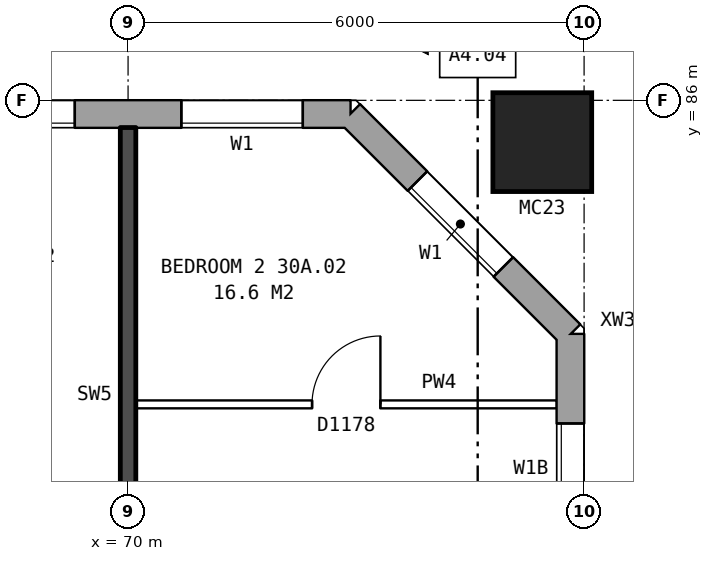
"""IFC4 building model, lengths in metres.
Left out: names, types, materials, properties, quantities, classifications, styles, units other than length and angle.
Written with IfcOpenShell. Run it as: python <this file> out.ifc"""

import sys

from ifc_helpers import new_model, si_unit, direction, frame, frame_2d, origin, origin_2d, place, context, subcontext, project, spatial, rectangle, hollow_rectangle, extrude, element, fill, save


model = new_model("IFC4")
c1 = context("Model", 3, precision=1e-05, world=origin(), true_north=direction((0.0, 1.0)))
c2 = subcontext(c1, "Body", "Model", "MODEL_VIEW")
j1 = project(units=[si_unit("LENGTHUNIT", "METRE"), si_unit("PLANEANGLEUNIT", "RADIAN")], contexts=[c1])
p1 = place(None, origin())
s1 = spatial("IfcSite", under=j1, at=p1, CompositionType="ELEMENT")
p2 = place(p1, origin())
s2 = spatial("IfcBuilding", under=s1, at=p2, CompositionType="ELEMENT")
p3 = place(p2, frame((0.0, 0.0, 108.8)))
s3 = spatial("IfcBuildingStorey", under=s2, at=p3, CompositionType="ELEMENT", Elevation=108.8)
p4 = place(p3, frame((75.45, 85.45, 0.0), z_axis=(0.0, 0.0, 1.0), x_axis=(1.0, 0.0, 0.0)))
e1 = element("IfcColumn", 1, at=p4, inside=s3, PredefinedType="COLUMN", context=c2, shape_type="SweptSolid", body=[
    extrude(hollow_rectangle(XDim=1.3, YDim=1.3, WallThickness=0.07, at=origin_2d()), origin(), (0.0, 0.0, 1.0), 3.1),
])
p5 = place(p3, frame((75.82, 57.075, 0.0), z_axis=(0.0, 0.0, 1.0), x_axis=(0.0, 1.0, 0.0)))
e2 = element("IfcWall", 2, at=p5, inside=s3, PredefinedType="STANDARD", context=c2, shape_type="SweptSolid", body=[
    extrude(rectangle(XDim=25.851, YDim=0.36, at=frame_2d((12.925, 0.0))), origin(), (0.0, 0.0, 1.0), 2.85),
])
p6 = place(p5, frame((0.3, 0.0, 0.8)))
e3 = element("IfcOpeningElement", 3, at=p6, cuts=e2, PredefinedType="OPENING", context=c2, shape_type="SweptSolid", body=[
    extrude(rectangle(XDim=1.4, YDim=1.8, at=frame_2d((0.7, 0.9))), frame((0.0, 0.19, 0.0), z_axis=(0.0, -1.0, 0.0), x_axis=(1.0, 0.0, 0.0)), (0.0, 0.0, 1.0), 0.38),
])
p7 = place(p5, frame((4.075, 0.0, 0.25)))
e4 = element("IfcOpeningElement", 4, at=p7, cuts=e2, PredefinedType="OPENING", context=c2, shape_type="SweptSolid", body=[
    extrude(rectangle(XDim=0.6, YDim=0.9, at=frame_2d((0.3, 0.45))), frame((0.0, 0.19, 0.0), z_axis=(0.0, -1.0, 0.0), x_axis=(1.0, 0.0, 0.0)), (0.0, 0.0, 1.0), 0.38),
])
p8 = place(p5, frame((19.225, 0.0, 1.7)))
e5 = element("IfcOpeningElement", 5, at=p8, cuts=e2, PredefinedType="OPENING", context=c2, shape_type="SweptSolid", body=[
    extrude(rectangle(XDim=1.6, YDim=0.9, at=frame_2d((0.8, 0.45))), frame((0.0, 0.19, 0.0), z_axis=(0.0, -1.0, 0.0), x_axis=(1.0, 0.0, 0.0)), (0.0, 0.0, 1.0), 0.38),
])
p9 = place(p5, frame((21.975, 0.0, 0.8)))
e6 = element("IfcOpeningElement", 6, at=p9, cuts=e2, PredefinedType="OPENING", context=c2, shape_type="SweptSolid", body=[
    extrude(rectangle(XDim=1.2, YDim=0.9, at=frame_2d((0.6, 0.45))), frame((0.0, 0.19, 0.0), z_axis=(0.0, -1.0, 0.0), x_axis=(1.0, 0.0, 0.0)), (0.0, 0.0, 1.0), 0.38),
])
p10 = place(p5, frame((2.0, 0.0, 0.8)))
e7 = element("IfcOpeningElement", 7, at=p10, cuts=e2, PredefinedType="OPENING", context=c2, shape_type="SweptSolid", body=[
    extrude(rectangle(XDim=0.8, YDim=1.5, at=frame_2d((0.4, 0.75))), frame((0.0, 0.19, 0.0), z_axis=(0.0, -1.0, 0.0), x_axis=(1.0, 0.0, 0.0)), (0.0, 0.0, 1.0), 0.38),
])
p11 = place(p5, frame((5.075, 0.0, 1.65)))
e8 = element("IfcOpeningElement", 8, at=p11, cuts=e2, PredefinedType="OPENING", context=c2, shape_type="SweptSolid", body=[
    extrude(rectangle(XDim=1.4, YDim=0.9, at=frame_2d((0.7, 0.45))), frame((0.0, 0.19, 0.0), z_axis=(0.0, -1.0, 0.0), x_axis=(1.0, 0.0, 0.0)), (0.0, 0.0, 1.0), 0.38),
])
p12 = place(p5, frame((23.475, 0.0, 0.8)))
e9 = element("IfcOpeningElement", 9, at=p12, cuts=e2, PredefinedType="OPENING", context=c2, shape_type="SweptSolid", body=[
    extrude(rectangle(XDim=1.2, YDim=1.8, at=frame_2d((0.6, 0.9))), frame((0.0, 0.19, 0.0), z_axis=(0.0, -1.0, 0.0), x_axis=(1.0, 0.0, 0.0)), (0.0, 0.0, 1.0), 0.38),
])
p13 = place(p3, frame((75.82, 82.925, 0.0), z_axis=(0.0, 0.0, 1.0), x_axis=(-0.707106781187, 0.707106781187, 0.0)))
e10 = element("IfcWall", 10, at=p13, inside=s3, PredefinedType="STANDARD", context=c2, shape_type="SweptSolid", body=[
    extrude(rectangle(XDim=4.094, YDim=0.36, at=frame_2d((2.047, 0.0))), origin(), (0.0, 0.0, 1.0), 2.85),
])
p14 = place(p13, frame((1.247, 0.0, 0.8)))
e11 = element("IfcOpeningElement", 11, at=p14, cuts=e10, PredefinedType="OPENING", context=c2, shape_type="SweptSolid", body=[
    extrude(rectangle(XDim=1.6, YDim=1.8, at=frame_2d((0.8, 0.9))), frame((0.0, 0.19, 0.0), z_axis=(0.0, -1.0, 0.0), x_axis=(1.0, 0.0, 0.0)), (0.0, 0.0, 1.0), 0.38),
])
p15 = place(p3, frame((72.925, 85.82, 0.0), z_axis=(0.0, 0.0, 1.0), x_axis=(-1.0, 0.0, 0.0)))
e12 = element("IfcWall", 12, at=p15, inside=s3, PredefinedType="STANDARD", context=c2, shape_type="SweptSolid", body=[
    extrude(rectangle(XDim=44.851, YDim=0.36, at=frame_2d((22.425, 0.0))), origin(), (0.0, 0.0, 1.0), 2.85),
])
p16 = place(p15, frame((0.625, 0.0, 0.8)))
e13 = element("IfcOpeningElement", 13, at=p16, cuts=e12, PredefinedType="OPENING", context=c2, shape_type="SweptSolid", body=[
    extrude(rectangle(XDim=1.6, YDim=1.8, at=frame_2d((0.8, 0.9))), frame((0.0, 0.19, 0.0), z_axis=(0.0, -1.0, 0.0), x_axis=(1.0, 0.0, 0.0)), (0.0, 0.0, 1.0), 0.38),
])
p17 = place(p15, frame((3.625, 0.0, 0.8)))
e14 = element("IfcOpeningElement", 14, at=p17, cuts=e12, PredefinedType="OPENING", context=c2, shape_type="SweptSolid", body=[
    extrude(rectangle(XDim=1.6, YDim=1.8, at=frame_2d((0.8, 0.9))), frame((0.0, 0.19, 0.0), z_axis=(0.0, -1.0, 0.0), x_axis=(1.0, 0.0, 0.0)), (0.0, 0.0, 1.0), 0.38),
])
p18 = place(p15, frame((6.625, 0.0, 0.8)))
e15 = element("IfcOpeningElement", 15, at=p18, cuts=e12, PredefinedType="OPENING", context=c2, shape_type="SweptSolid", body=[
    extrude(rectangle(XDim=1.6, YDim=1.8, at=frame_2d((0.8, 0.9))), frame((0.0, 0.19, 0.0), z_axis=(0.0, -1.0, 0.0), x_axis=(1.0, 0.0, 0.0)), (0.0, 0.0, 1.0), 0.38),
])
p19 = place(p15, frame((9.625, 0.0, 0.8)))
e16 = element("IfcOpeningElement", 16, at=p19, cuts=e12, PredefinedType="OPENING", context=c2, shape_type="SweptSolid", body=[
    extrude(rectangle(XDim=1.6, YDim=1.8, at=frame_2d((0.8, 0.9))), frame((0.0, 0.19, 0.0), z_axis=(0.0, -1.0, 0.0), x_axis=(1.0, 0.0, 0.0)), (0.0, 0.0, 1.0), 0.38),
])
p20 = place(p15, frame((12.625, 0.0, 0.8)))
e17 = element("IfcOpeningElement", 17, at=p20, cuts=e12, PredefinedType="OPENING", context=c2, shape_type="SweptSolid", body=[
    extrude(rectangle(XDim=1.6, YDim=1.8, at=frame_2d((0.8, 0.9))), frame((0.0, 0.19, 0.0), z_axis=(0.0, -1.0, 0.0), x_axis=(1.0, 0.0, 0.0)), (0.0, 0.0, 1.0), 0.38),
])
p21 = place(p15, frame((15.125, 0.0, 1.65)))
e18 = element("IfcOpeningElement", 18, at=p21, cuts=e12, PredefinedType="OPENING", context=c2, shape_type="SweptSolid", body=[
    extrude(rectangle(XDim=1.0, YDim=0.9, at=frame_2d((0.5, 0.45))), frame((0.0, 0.19, 0.0), z_axis=(0.0, -1.0, 0.0), x_axis=(1.0, 0.0, 0.0)), (0.0, 0.0, 1.0), 0.38),
])
p22 = place(p15, frame((18.625, 0.0, 0.8)))
e19 = element("IfcOpeningElement", 19, at=p22, cuts=e12, PredefinedType="OPENING", context=c2, shape_type="SweptSolid", body=[
    extrude(rectangle(XDim=1.6, YDim=1.8, at=frame_2d((0.8, 0.9))), frame((0.0, 0.19, 0.0), z_axis=(0.0, -1.0, 0.0), x_axis=(1.0, 0.0, 0.0)), (0.0, 0.0, 1.0), 0.38),
])
p23 = place(p15, frame((21.625, 0.0, 0.8)))
e20 = element("IfcOpeningElement", 20, at=p23, cuts=e12, PredefinedType="OPENING", context=c2, shape_type="SweptSolid", body=[
    extrude(rectangle(XDim=1.6, YDim=1.8, at=frame_2d((0.8, 0.9))), frame((0.0, 0.19, 0.0), z_axis=(0.0, -1.0, 0.0), x_axis=(1.0, 0.0, 0.0)), (0.0, 0.0, 1.0), 0.38),
])
p24 = place(p15, frame((24.625, 0.0, 0.8)))
e21 = element("IfcOpeningElement", 21, at=p24, cuts=e12, PredefinedType="OPENING", context=c2, shape_type="SweptSolid", body=[
    extrude(rectangle(XDim=1.6, YDim=1.8, at=frame_2d((0.8, 0.9))), frame((0.0, 0.19, 0.0), z_axis=(0.0, -1.0, 0.0), x_axis=(1.0, 0.0, 0.0)), (0.0, 0.0, 1.0), 0.38),
])
p25 = place(p15, frame((29.075, 0.0, 1.4)))
e22 = element("IfcOpeningElement", 22, at=p25, cuts=e12, PredefinedType="OPENING", context=c2, shape_type="SweptSolid", body=[
    extrude(rectangle(XDim=1.2, YDim=1.2, at=frame_2d((0.6, 0.6))), frame((0.0, 0.19, 0.0), z_axis=(0.0, -1.0, 0.0), x_axis=(1.0, 0.0, 0.0)), (0.0, 0.0, 1.0), 0.38),
])
p26 = place(p15, frame((30.625, 0.0, 0.8)))
e23 = element("IfcOpeningElement", 23, at=p26, cuts=e12, PredefinedType="OPENING", context=c2, shape_type="SweptSolid", body=[
    extrude(rectangle(XDim=1.6, YDim=1.8, at=frame_2d((0.8, 0.9))), frame((0.0, 0.19, 0.0), z_axis=(0.0, -1.0, 0.0), x_axis=(1.0, 0.0, 0.0)), (0.0, 0.0, 1.0), 0.38),
])
p27 = place(p15, frame((33.625, 0.0, 0.8)))
e24 = element("IfcOpeningElement", 24, at=p27, cuts=e12, PredefinedType="OPENING", context=c2, shape_type="SweptSolid", body=[
    extrude(rectangle(XDim=1.6, YDim=1.8, at=frame_2d((0.8, 0.9))), frame((0.0, 0.19, 0.0), z_axis=(0.0, -1.0, 0.0), x_axis=(1.0, 0.0, 0.0)), (0.0, 0.0, 1.0), 0.38),
])
p28 = place(p15, frame((36.625, 0.0, 0.8)))
e25 = element("IfcOpeningElement", 25, at=p28, cuts=e12, PredefinedType="OPENING", context=c2, shape_type="SweptSolid", body=[
    extrude(rectangle(XDim=1.6, YDim=1.8, at=frame_2d((0.8, 0.9))), frame((0.0, 0.19, 0.0), z_axis=(0.0, -1.0, 0.0), x_axis=(1.0, 0.0, 0.0)), (0.0, 0.0, 1.0), 0.38),
])
p29 = place(p15, frame((39.625, 0.0, 0.8)))
e26 = element("IfcOpeningElement", 26, at=p29, cuts=e12, PredefinedType="OPENING", context=c2, shape_type="SweptSolid", body=[
    extrude(rectangle(XDim=1.6, YDim=1.8, at=frame_2d((0.8, 0.9))), frame((0.0, 0.19, 0.0), z_axis=(0.0, -1.0, 0.0), x_axis=(1.0, 0.0, 0.0)), (0.0, 0.0, 1.0), 0.38),
])
p30 = place(p15, frame((42.625, 0.0, 0.8)))
e27 = element("IfcOpeningElement", 27, at=p30, cuts=e12, PredefinedType="OPENING", context=c2, shape_type="SweptSolid", body=[
    extrude(rectangle(XDim=1.6, YDim=1.8, at=frame_2d((0.8, 0.9))), frame((0.0, 0.19, 0.0), z_axis=(0.0, -1.0, 0.0), x_axis=(1.0, 0.0, 0.0)), (0.0, 0.0, 1.0), 0.38),
])
p31 = place(p15, frame((16.525, 0.0, 0.15)))
e28 = element("IfcOpeningElement", 28, at=p31, cuts=e12, PredefinedType="OPENING", context=c2, shape_type="SweptSolid", body=[
    extrude(rectangle(XDim=1.2, YDim=0.9, at=frame_2d((0.6, 0.45))), frame((0.0, 0.19, 0.0), z_axis=(0.0, -1.0, 0.0), x_axis=(1.0, 0.0, 0.0)), (0.0, 0.0, 1.0), 0.38),
])
p32 = place(p3, frame((70.1, 82.0, 0.0), z_axis=(0.0, 0.0, 1.0), x_axis=(1.0, 0.0, 0.0)))
e29 = element("IfcWall", 29, at=p32, inside=s3, PredefinedType="PARTITIONING", context=c2, shape_type="SweptSolid", body=[
    extrude(rectangle(XDim=5.54, YDim=0.1, at=frame_2d((2.77, 0.0))), origin(), (0.0, 0.0, 1.0), 2.85),
])
p33 = place(p32, frame((2.32, 0.0, 0.0)))
e30 = element("IfcOpeningElement", 30, at=p33, cuts=e29, PredefinedType="OPENING", context=c2, shape_type="SweptSolid", body=[
    extrude(rectangle(XDim=0.9, YDim=2.1, at=frame_2d((0.45, 1.05))), frame((0.0, 0.06, 0.0), z_axis=(0.0, -1.0, 0.0), x_axis=(1.0, 0.0, 0.0)), (0.0, 0.0, 1.0), 0.12),
])
p34 = place(p3, frame((70.0, 76.2, 0.0), z_axis=(0.0, 0.0, 1.0), x_axis=(0.0, 1.0, 0.0)))
e31 = element("IfcWall", 31, at=p34, inside=s3, PredefinedType="SOLIDWALL", context=c2, shape_type="SweptSolid", body=[
    extrude(rectangle(XDim=9.44, YDim=0.2, at=frame_2d((4.72, 0.0))), origin(), (0.0, 0.0, 1.0), 2.85),
])
p35 = place(p34, frame((1.5, 0.0, 0.0)))
e32 = element("IfcOpeningElement", 32, at=p35, cuts=e31, PredefinedType="OPENING", context=c2, shape_type="SweptSolid", body=[
    extrude(rectangle(XDim=0.9, YDim=2.1, at=frame_2d((0.45, 1.05))), frame((0.0, 0.11, 0.0), z_axis=(0.0, -1.0, 0.0), x_axis=(1.0, 0.0, 0.0)), (0.0, 0.0, 1.0), 0.22),
])
p36 = place(p14, origin())
e33 = element("IfcWindow", 33, at=p36, inside=s3, PartitioningType="SINGLE_PANEL", PredefinedType="WINDOW", context=c2, shape_type="SweptSolid", body=[
    extrude(rectangle(XDim=1.6, YDim=1.8, at=frame_2d((0.8, 0.9))), frame((0.0, 0.15, 0.0), z_axis=(0.0, -1.0, 0.0), x_axis=(1.0, 0.0, 0.0)), (0.0, 0.0, 1.0), 0.06),
])
fill(e11, e33)
p37 = place(p16, origin())
e34 = element("IfcWindow", 34, at=p37, inside=s3, PartitioningType="SINGLE_PANEL", PredefinedType="WINDOW", context=c2, shape_type="SweptSolid", body=[
    extrude(rectangle(XDim=1.6, YDim=1.8, at=frame_2d((0.8, 0.9))), frame((0.0, 0.15, 0.0), z_axis=(0.0, -1.0, 0.0), x_axis=(1.0, 0.0, 0.0)), (0.0, 0.0, 1.0), 0.06),
])
fill(e13, e34)
p38 = place(p17, origin())
e35 = element("IfcWindow", 35, at=p38, inside=s3, PartitioningType="SINGLE_PANEL", PredefinedType="WINDOW", context=c2, shape_type="SweptSolid", body=[
    extrude(rectangle(XDim=1.6, YDim=1.8, at=frame_2d((0.8, 0.9))), frame((0.0, 0.15, 0.0), z_axis=(0.0, -1.0, 0.0), x_axis=(1.0, 0.0, 0.0)), (0.0, 0.0, 1.0), 0.06),
])
fill(e14, e35)
p39 = place(p33, origin())
e36 = element("IfcDoor", 36, at=p39, inside=s3, OperationType="SINGLE_SWING_RIGHT", PredefinedType="DOOR", context=c2, shape_type="SweptSolid", body=[
    extrude(rectangle(XDim=0.9, YDim=2.1, at=frame_2d((0.45, 1.05))), frame((0.0, 0.025, 0.0), z_axis=(0.0, -1.0, 0.0), x_axis=(1.0, 0.0, 0.0)), (0.0, 0.0, 1.0), 0.05),
])
fill(e30, e36)
p40 = place(p12, origin())
e37 = element("IfcWindow", 37, at=p40, inside=s3, PartitioningType="SINGLE_PANEL", PredefinedType="WINDOW", context=c2, shape_type="SweptSolid", body=[
    extrude(rectangle(XDim=1.2, YDim=1.8, at=frame_2d((0.6, 0.9))), frame((0.0, 0.15, 0.0), z_axis=(0.0, -1.0, 0.0), x_axis=(1.0, 0.0, 0.0)), (0.0, 0.0, 1.0), 0.06),
])
fill(e9, e37)
save(model, sys.argv[1])
